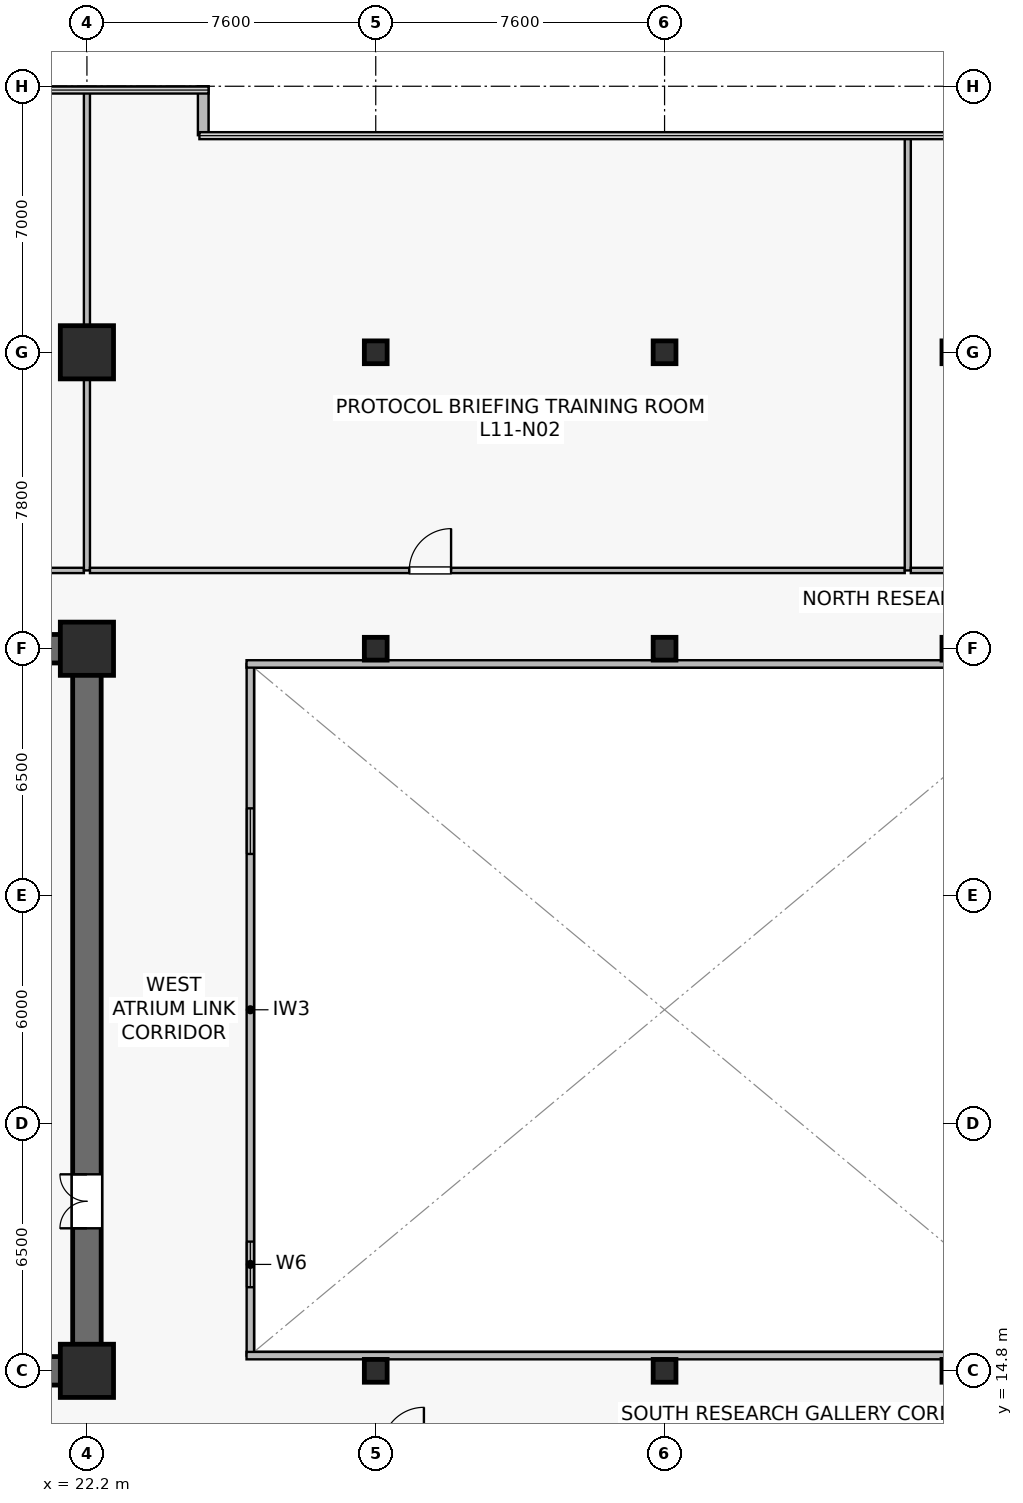
"""IFC4 building model, lengths in metres.
Left out: names, types, materials, properties, quantities, classifications, styles, units other than length and angle.
Written with IfcOpenShell. Run it as: python <this file> out.ifc"""

import sys

from ifc_helpers import new_model, si_unit, direction, frame, frame_2d, origin, origin_2d, place, context, subcontext, project, spatial, rectangle, hollow_rectangle, extrude, source, transform, mapped, element, fill, save


model = new_model("IFC4")
c1 = context("Model", 3, precision=1e-05, world=origin(), true_north=direction((0.0, 1.0)))
c2 = subcontext(c1, "Body", "Model", "MODEL_VIEW")
j1 = project(units=[si_unit("LENGTHUNIT", "METRE"), si_unit("PLANEANGLEUNIT", "RADIAN")], contexts=[c1])
p1 = place(None, origin())
s1 = spatial("IfcSite", under=j1, at=p1, CompositionType="ELEMENT")
p2 = place(p1, origin())
s2 = spatial("IfcBuilding", under=s1, at=p2, CompositionType="ELEMENT")
p3 = place(p2, frame((0.0, 0.0, 45.7)))
s3 = spatial("IfcBuildingStorey", under=s2, at=p3, CompositionType="ELEMENT", Elevation=45.7)
p4 = place(p3, frame((7.025, 14.8, 0.0), z_axis=(0.0, 0.0, 1.0), x_axis=(1.0, 0.0, 0.0)))
e1 = element("IfcWall", 1, at=p4, inside=s3, PredefinedType="SHEAR", context=c2, shape_type="SweptSolid", body=[
    extrude(rectangle(XDim=15.55, YDim=0.75, at=frame_2d((7.775, 0.0))), origin(), (0.0, 0.0, 1.0), 3.78),
])
p5 = place(p3, frame((7.025, 33.8, 0.0), z_axis=(0.0, 0.0, 1.0), x_axis=(1.0, 0.0, 0.0)))
e2 = element("IfcWall", 2, at=p5, inside=s3, PredefinedType="SHEAR", context=c2, shape_type="SweptSolid", body=[
    extrude(rectangle(XDim=15.55, YDim=0.75, at=frame_2d((7.775, 0.0))), origin(), (0.0, 0.0, 1.0), 3.78),
])
p6 = place(p5, frame((5.725, 0.0, 0.0)))
e3 = element("IfcOpeningElement", 3, at=p6, cuts=e2, PredefinedType="OPENING", context=c2, shape_type="SweptSolid", body=[
    extrude(rectangle(XDim=0.95, YDim=2.15, at=frame_2d((0.475, 1.075))), frame((0.0, 0.385, 0.0), z_axis=(0.0, -1.0, 0.0), x_axis=(1.0, 0.0, 0.0)), (0.0, 0.0, 1.0), 0.77),
])
p7 = place(p5, frame((9.09, 0.0, 0.0)))
e4 = element("IfcOpeningElement", 4, at=p7, cuts=e2, PredefinedType="OPENING", context=c2, shape_type="SweptSolid", body=[
    extrude(rectangle(XDim=0.95, YDim=2.15, at=frame_2d((0.475, 1.075))), frame((0.0, 0.385, 0.0), z_axis=(0.0, -1.0, 0.0), x_axis=(1.0, 0.0, 0.0)), (0.0, 0.0, 1.0), 0.77),
])
p8 = place(p5, frame((12.49, 0.0, 0.0)))
e5 = element("IfcOpeningElement", 5, at=p8, cuts=e2, PredefinedType="OPENING", context=c2, shape_type="SweptSolid", body=[
    extrude(rectangle(XDim=0.95, YDim=2.15, at=frame_2d((0.475, 1.075))), frame((0.0, 0.385, 0.0), z_axis=(0.0, -1.0, 0.0), x_axis=(1.0, 0.0, 0.0)), (0.0, 0.0, 1.0), 0.77),
])
p9 = place(p3, frame((22.2, 15.175, 0.0), z_axis=(0.0, 0.0, 1.0), x_axis=(0.0, 1.0, 0.0)))
e6 = element("IfcWall", 6, at=p9, inside=s3, PredefinedType="SHEAR", context=c2, shape_type="SweptSolid", body=[
    extrude(rectangle(XDim=18.25, YDim=0.75, at=frame_2d((9.125, 0.0))), origin(), (0.0, 0.0, 1.0), 3.78),
])
p10 = place(p9, frame((3.375, 0.0, 0.0)))
e7 = element("IfcOpeningElement", 7, at=p10, cuts=e6, PredefinedType="OPENING", context=c2, shape_type="SweptSolid", body=[
    extrude(rectangle(XDim=1.42, YDim=2.2, at=frame_2d((0.71, 1.1))), frame((0.0, 0.385, 0.0), z_axis=(0.0, -1.0, 0.0), x_axis=(1.0, 0.0, 0.0)), (0.0, 0.0, 1.0), 0.77),
])
m1 = source(origin(), c2, "Body", "SweptSolid", [
    extrude(rectangle(XDim=1.4, YDim=1.4, at=origin_2d()), origin(), (0.0, 0.0, 1.0), 4.1),
])
for number, where, z_axis, x_axis in (
    (8, (22.2, 14.8, 0.0), (0.0, 0.0, 1.0), (1.0, 0.0, 0.0)),
    (9, (22.2, 33.8, 0.0), (0.0, 0.0, 1.0), (1.0, 0.0, 0.0)),
    (10, (22.2, 41.6, 0.0), (0.0, 0.0, 1.0), (1.0, 0.0, 0.0)),
):
    element("IfcColumn", number, at=place(p3, frame(where, z_axis=z_axis, x_axis=x_axis)), inside=s3, PredefinedType="COLUMN", context=c2, shape_type="MappedRepresentation", body=[
        mapped(m1, transform((0.0, 0.0, 0.0), scale=1.0)),
    ])
m2 = source(origin(), c2, "Body", "SweptSolid", [
    extrude(hollow_rectangle(XDim=0.6, YDim=0.6, WallThickness=0.028, at=origin_2d()), origin(), (0.0, 0.0, 1.0), 4.1),
])
for number, where, z_axis, x_axis in (
    (11, (29.8, 14.8, 0.0), (0.0, 0.0, 1.0), (1.0, 0.0, 0.0)),
    (12, (29.8, 33.8, 0.0), (0.0, 0.0, 1.0), (1.0, 0.0, 0.0)),
    (13, (29.8, 41.6, 0.0), (0.0, 0.0, 1.0), (1.0, 0.0, 0.0)),
    (14, (37.4, 14.8, 0.0), (0.0, 0.0, 1.0), (1.0, 0.0, 0.0)),
    (15, (37.4, 33.8, 0.0), (0.0, 0.0, 1.0), (1.0, 0.0, 0.0)),
    (16, (37.4, 41.6, 0.0), (0.0, 0.0, 1.0), (1.0, 0.0, 0.0)),
    (17, (45.0, 14.8, 0.0), (0.0, 0.0, 1.0), (1.0, 0.0, 0.0)),
    (18, (45.0, 33.8, 0.0), (0.0, 0.0, 1.0), (1.0, 0.0, 0.0)),
    (19, (45.0, 41.6, 0.0), (0.0, 0.0, 1.0), (1.0, 0.0, 0.0)),
):
    element("IfcColumn", number, at=place(p3, frame(where, z_axis=z_axis, x_axis=x_axis)), inside=s3, PredefinedType="COLUMN", context=c2, shape_type="MappedRepresentation", body=[
        mapped(m2, transform((0.0, 0.0, 0.0), scale=1.0)),
    ])
p11 = place(p3, frame((25.26, 47.312, 0.0), z_axis=(0.0, 0.0, 1.0), x_axis=(0.0, 1.0, 0.0)))
e20 = element("IfcWall", 20, at=p11, inside=s3, PredefinedType="STANDARD", context=c2, shape_type="SweptSolid", body=[
    extrude(rectangle(XDim=1.288, YDim=0.28, at=frame_2d((0.644, 0.0))), origin(), (0.0, 0.0, 1.0), 3.78),
])
p12 = place(p3, frame((26.5, 15.2, 0.0), z_axis=(0.0, 0.0, 1.0), x_axis=(0.0, 1.0, 0.0)))
e21 = element("IfcWall", 21, at=p12, inside=s3, PredefinedType="SOLIDWALL", context=c2, shape_type="SweptSolid", body=[
    extrude(rectangle(XDim=18.2, YDim=0.195, at=frame_2d((9.1, 0.0))), origin(), (0.0, 0.0, 1.0), 3.78),
])
p13 = place(p12, frame((1.8, 0.0, 0.9)))
e22 = element("IfcOpeningElement", 22, at=p13, cuts=e21, PredefinedType="OPENING", context=c2, shape_type="SweptSolid", body=[
    extrude(rectangle(XDim=1.2, YDim=1.35, at=frame_2d((0.6, 0.675))), frame((0.0, 0.107, 0.0), z_axis=(0.0, -1.0, 0.0), x_axis=(1.0, 0.0, 0.0)), (0.0, 0.0, 1.0), 0.215),
])
p14 = place(p12, frame((13.2, 0.0, 0.9)))
e23 = element("IfcOpeningElement", 23, at=p14, cuts=e21, PredefinedType="OPENING", context=c2, shape_type="SweptSolid", body=[
    extrude(rectangle(XDim=1.2, YDim=1.35, at=frame_2d((0.6, 0.675))), frame((0.0, 0.107, 0.0), z_axis=(0.0, -1.0, 0.0), x_axis=(1.0, 0.0, 0.0)), (0.0, 0.0, 1.0), 0.215),
])
for number, where, z_axis, x_axis in (
    (24, (26.4, 15.2, 0.0), (0.0, 0.0, 1.0), (1.0, 0.0, 0.0)),
    (25, (26.4, 33.4, 0.0), (0.0, 0.0, 1.0), (1.0, 0.0, 0.0)),
):
    element("IfcWall", number, at=place(p3, frame(where, z_axis=z_axis, x_axis=x_axis)), inside=s3, PredefinedType="SOLIDWALL", context=c2, shape_type="SweptSolid", body=[
        extrude(rectangle(XDim=22.0, YDim=0.195, at=frame_2d((11.0, 0.0))), origin(), (0.0, 0.0, 1.0), 3.78),
    ])
p15 = place(p3, frame((6.98, 35.86, 0.0), z_axis=(0.0, 0.0, 1.0), x_axis=(1.0, 0.0, 0.0)))
e26 = element("IfcWall", 26, at=p15, inside=s3, PredefinedType="PARTITIONING", context=c2, shape_type="SweptSolid", body=[
    extrude(rectangle(XDim=15.14, YDim=0.14, at=frame_2d((7.57, 0.0))), origin(), (0.0, 0.0, 1.0), 3.065),
])
p16 = place(p15, frame((7.42, 0.0, 0.0)))
e27 = element("IfcOpeningElement", 27, at=p16, cuts=e26, PredefinedType="OPENING", context=c2, shape_type="SweptSolid", body=[
    extrude(rectangle(XDim=1.1, YDim=2.18, at=frame_2d((0.55, 1.09))), frame((0.0, 0.08, 0.0), z_axis=(0.0, -1.0, 0.0), x_axis=(1.0, 0.0, 0.0)), (0.0, 0.0, 1.0), 0.16),
])
p17 = place(p3, frame((22.2, 35.86, 0.0), z_axis=(0.0, 0.0, 1.0), x_axis=(0.0, 1.0, 0.0)))
e28 = element("IfcWall", 28, at=p17, inside=s3, PredefinedType="PARTITIONING", context=c2, shape_type="SweptSolid", body=[
    extrude(rectangle(XDim=12.63, YDim=0.16, at=frame_2d((6.315, 0.0))), origin(), (0.0, 0.0, 1.0), 3.015),
])
p18 = place(p3, frame((22.28, 35.86, 0.0), z_axis=(0.0, 0.0, 1.0), x_axis=(1.0, 0.0, 0.0)))
e29 = element("IfcWall", 29, at=p18, inside=s3, PredefinedType="PARTITIONING", context=c2, shape_type="SweptSolid", body=[
    extrude(rectangle(XDim=21.44, YDim=0.14, at=frame_2d((10.72, 0.0))), origin(), (0.0, 0.0, 1.0), 3.065),
])
p19 = place(p18, frame((8.402, 0.0, 0.0)))
e30 = element("IfcOpeningElement", 30, at=p19, cuts=e29, PredefinedType="OPENING", context=c2, shape_type="SweptSolid", body=[
    extrude(rectangle(XDim=1.1, YDim=2.18, at=frame_2d((0.55, 1.09))), frame((0.0, 0.08, 0.0), z_axis=(0.0, -1.0, 0.0), x_axis=(1.0, 0.0, 0.0)), (0.0, 0.0, 1.0), 0.16),
])
p20 = place(p3, frame((43.8, 35.86, 0.0), z_axis=(0.0, 0.0, 1.0), x_axis=(0.0, 1.0, 0.0)))
e31 = element("IfcWall", 31, at=p20, inside=s3, PredefinedType="PARTITIONING", context=c2, shape_type="SweptSolid", body=[
    extrude(rectangle(XDim=11.43, YDim=0.16, at=frame_2d((5.715, 0.0))), origin(), (0.0, 0.0, 1.0), 3.015),
])
p21 = place(p3, frame((43.88, 35.86, 0.0), z_axis=(0.0, 0.0, 1.0), x_axis=(1.0, 0.0, 0.0)))
e32 = element("IfcWall", 32, at=p21, inside=s3, PredefinedType="PARTITIONING", context=c2, shape_type="SweptSolid", body=[
    extrude(rectangle(XDim=23.94, YDim=0.14, at=frame_2d((11.97, 0.0))), origin(), (0.0, 0.0, 1.0), 3.065),
])
p22 = place(p21, frame((12.084, 0.0, 0.0)))
e33 = element("IfcOpeningElement", 33, at=p22, cuts=e32, PredefinedType="OPENING", context=c2, shape_type="SweptSolid", body=[
    extrude(rectangle(XDim=1.1, YDim=2.18, at=frame_2d((0.55, 1.09))), frame((0.0, 0.08, 0.0), z_axis=(0.0, -1.0, 0.0), x_axis=(1.0, 0.0, 0.0)), (0.0, 0.0, 1.0), 0.16),
])
m3 = source(origin(), c2, "Body", "SweptSolid", [
    extrude(rectangle(XDim=1.2, YDim=1.35, at=frame_2d((0.6, 0.675))), frame((0.0, 0.03, 0.0), z_axis=(0.0, -1.0, 0.0), x_axis=(1.0, 0.0, 0.0)), (0.0, 0.0, 1.0), 0.06),
])
p23 = place(p13, origin())
e34 = element("IfcWindow", 34, at=p23, inside=s3, PartitioningType="SINGLE_PANEL", PredefinedType="WINDOW", context=c2, shape_type="MappedRepresentation", body=[
    mapped(m3, transform((0.0, 0.0, 0.0), scale=1.0)),
])
fill(e22, e34)
p24 = place(p14, origin())
e35 = element("IfcWindow", 35, at=p24, inside=s3, PartitioningType="SINGLE_PANEL", PredefinedType="WINDOW", context=c2, shape_type="MappedRepresentation", body=[
    mapped(m3, transform((0.0, 0.0, 0.0), scale=1.0)),
])
fill(e23, e35)
m4 = source(origin(), c2, "Body", "SweptSolid", [
    extrude(rectangle(XDim=1.42, YDim=2.2, at=frame_2d((0.71, 1.1))), frame((0.0, 0.025, 0.0), z_axis=(0.0, -1.0, 0.0), x_axis=(1.0, 0.0, 0.0)), (0.0, 0.0, 1.0), 0.05),
])
p25 = place(p10, origin())
e36 = element("IfcDoor", 36, at=p25, inside=s3, OperationType="DOUBLE_DOOR_SINGLE_SWING", PredefinedType="DOOR", context=c2, shape_type="MappedRepresentation", body=[
    mapped(m4, transform((0.0, 0.0, 0.0), scale=1.0)),
])
fill(e7, e36)
m5 = source(origin(), c2, "Body", "SweptSolid", [
    extrude(rectangle(XDim=1.1, YDim=2.18, at=frame_2d((0.55, 1.09))), frame((0.0, 0.025, 0.0), z_axis=(0.0, -1.0, 0.0), x_axis=(1.0, 0.0, 0.0)), (0.0, 0.0, 1.0), 0.05),
])
p26 = place(p19, origin())
e37 = element("IfcDoor", 37, at=p26, inside=s3, OperationType="SINGLE_SWING_RIGHT", PredefinedType="DOOR", context=c2, shape_type="MappedRepresentation", body=[
    mapped(m5, transform((0.0, 0.0, 0.0), scale=1.0)),
])
fill(e30, e37)
save(model, sys.argv[1])
